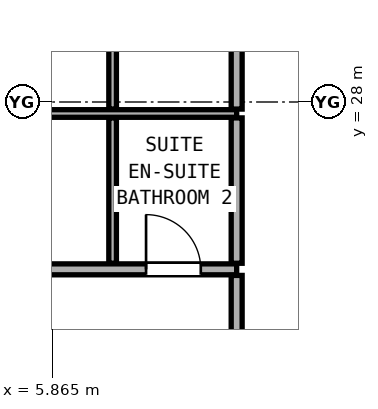
"""IFC4 building model, lengths in metres.
Left out: names, types, materials, properties, quantities, classifications, styles, units other than length and angle.
Written with IfcOpenShell. Run it as: python <this file> out.ifc"""

import sys

from ifc_helpers import new_model, si_unit, direction, frame, frame_2d, origin, place, context, subcontext, project, spatial, rectangle, extrude, element, fill, save


model = new_model("IFC4")
c1 = context("Model", 3, precision=1e-05, world=origin(), true_north=direction((0.0, 1.0)))
c2 = subcontext(c1, "Body", "Model", "MODEL_VIEW")
j1 = project(units=[si_unit("LENGTHUNIT", "METRE"), si_unit("PLANEANGLEUNIT", "RADIAN")], contexts=[c1])
p1 = place(None, origin())
s1 = spatial("IfcSite", under=j1, at=p1, CompositionType="ELEMENT")
p2 = place(p1, origin())
s2 = spatial("IfcBuilding", under=s1, at=p2, CompositionType="ELEMENT")
p3 = place(p2, frame((0.0, 0.0, 101.6)))
s3 = spatial("IfcBuildingStorey", under=s2, at=p3, CompositionType="ELEMENT", Elevation=101.6)
p4 = place(p3, frame((-0.85, 25.248, 0.0), z_axis=(0.0, 0.0, 1.0), x_axis=(1.0, 0.0, 0.0)))
e1 = element("IfcWall", 1, at=p4, inside=s3, PredefinedType="PARTITIONING", context=c2, shape_type="SweptSolid", body=[
    extrude(rectangle(XDim=9.75, YDim=0.18, at=frame_2d((4.875, 0.0))), origin(), (0.0, 0.0, 1.0), 2.145),
])
p5 = place(p4, frame((3.75, 0.0, 0.0)))
e2 = element("IfcOpeningElement", 2, at=p5, cuts=e1, PredefinedType="OPENING", context=c2, shape_type="SweptSolid", body=[
    extrude(rectangle(XDim=0.85, YDim=2.01, at=frame_2d((0.425, 1.005))), frame((0.0, 0.1, 0.0), z_axis=(0.0, -1.0, 0.0), x_axis=(1.0, 0.0, 0.0)), (0.0, 0.0, 1.0), 0.2),
])
p6 = place(p4, frame((8.26, 0.0, 0.0)))
e3 = element("IfcOpeningElement", 3, at=p6, cuts=e1, PredefinedType="OPENING", context=c2, shape_type="SweptSolid", body=[
    extrude(rectangle(XDim=0.9, YDim=2.1, at=frame_2d((0.45, 1.05))), frame((0.0, 0.1, 0.0), z_axis=(0.0, -1.0, 0.0), x_axis=(1.0, 0.0, 0.0)), (0.0, 0.0, 1.0), 0.2),
])
p7 = place(p3, frame((-0.85, 27.811, 0.0), z_axis=(0.0, 0.0, 1.0), x_axis=(1.0, 0.0, 0.0)))
e4 = element("IfcWall", 4, at=p7, inside=s3, PredefinedType="PARTITIONING", context=c2, shape_type="SweptSolid", body=[
    extrude(rectangle(XDim=9.75, YDim=0.125, at=frame_2d((4.875, 0.0))), origin(), (0.0, 0.0, 1.0), 2.145),
])
p8 = place(p3, frame((6.86, 25.348, 0.0), z_axis=(0.0, 0.0, 1.0), x_axis=(0.0, 1.0, 0.0)))
e5 = element("IfcWall", 5, at=p8, inside=s3, PredefinedType="PARTITIONING", context=c2, shape_type="SweptSolid", body=[
    extrude(rectangle(XDim=2.391, YDim=0.125, at=frame_2d((1.195, 0.0))), origin(), (0.0, 0.0, 1.0), 3.08),
])
p9 = place(p3, frame((6.86, 27.884, 0.0), z_axis=(0.0, 0.0, 1.0), x_axis=(0.0, 1.0, 0.0)))
e6 = element("IfcWall", 6, at=p9, inside=s3, PredefinedType="PARTITIONING", context=c2, shape_type="SweptSolid", body=[
    extrude(rectangle(XDim=2.547, YDim=0.125, at=frame_2d((1.274, 0.0))), origin(), (0.0, 0.0, 1.0), 3.08),
])
p10 = place(p3, frame((8.9, 22.041, 0.0), z_axis=(0.0, 0.0, 1.0), x_axis=(0.0, 1.0, 0.0)))
e7 = element("IfcWall", 7, at=p10, inside=s3, PredefinedType="PARTITIONING", context=c2, shape_type="SweptSolid", body=[
    extrude(rectangle(XDim=3.107, YDim=0.18, at=frame_2d((1.553, 0.0))), origin(), (0.0, 0.0, 1.0), 2.299),
])
p11 = place(p10, frame((1.029, 0.0, 0.0)))
e8 = element("IfcOpeningElement", 8, at=p11, cuts=e7, PredefinedType="OPENING", context=c2, shape_type="SweptSolid", body=[
    extrude(rectangle(XDim=1.05, YDim=2.2, at=frame_2d((0.525, 1.1))), frame((0.0, 0.1, 0.0), z_axis=(0.0, -1.0, 0.0), x_axis=(1.0, 0.0, 0.0)), (0.0, 0.0, 1.0), 0.2),
])
p12 = place(p3, frame((8.9, 25.348, 0.0), z_axis=(0.0, 0.0, 1.0), x_axis=(0.0, 1.0, 0.0)))
e9 = element("IfcWall", 9, at=p12, inside=s3, PredefinedType="PARTITIONING", context=c2, shape_type="SweptSolid", body=[
    extrude(rectangle(XDim=2.391, YDim=0.18, at=frame_2d((1.195, 0.0))), origin(), (0.0, 0.0, 1.0), 3.08),
])
p13 = place(p3, frame((8.9, 27.884, 0.0), z_axis=(0.0, 0.0, 1.0), x_axis=(0.0, 1.0, 0.0)))
e10 = element("IfcWall", 10, at=p13, inside=s3, PredefinedType="PARTITIONING", context=c2, shape_type="SweptSolid", body=[
    extrude(rectangle(XDim=2.547, YDim=0.18, at=frame_2d((1.274, 0.0))), origin(), (0.0, 0.0, 1.0), 3.08),
])
p14 = place(p6, origin())
e11 = element("IfcDoor", 11, at=p14, inside=s3, OperationType="SINGLE_SWING_LEFT", PredefinedType="DOOR", context=c2, shape_type="SweptSolid", body=[
    extrude(rectangle(XDim=0.9, YDim=2.1, at=frame_2d((0.45, 1.05))), frame((0.0, 0.025, 0.0), z_axis=(0.0, -1.0, 0.0), x_axis=(1.0, 0.0, 0.0)), (0.0, 0.0, 1.0), 0.05),
])
fill(e3, e11)
save(model, sys.argv[1])
